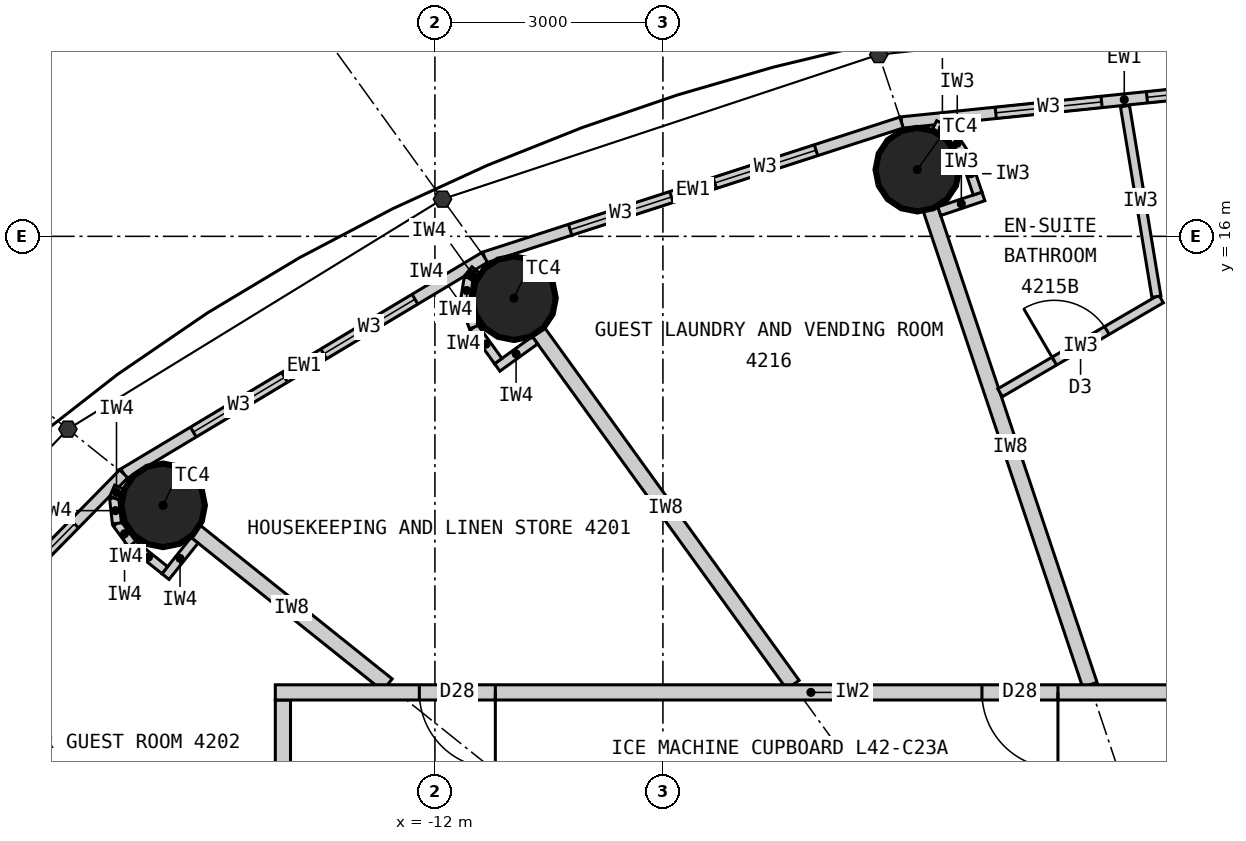
"""IFC4 building model, lengths in metres.
Left out: names, types, materials, properties, quantities, classifications, styles, units other than length and angle.
Written with IfcOpenShell. Run it as: python <this file> out.ifc"""

import sys

from ifc_helpers import new_model, si_unit, direction, frame, frame_2d, origin, origin_2d, place, context, subcontext, project, spatial, rectangle, circle, extrude, element, fill, save


model = new_model("IFC4")
c1 = context("Model", 3, precision=1e-05, world=origin(), true_north=direction((0.0, 1.0)))
c2 = subcontext(c1, "Body", "Model", "MODEL_VIEW")
j1 = project(units=[si_unit("LENGTHUNIT", "METRE"), si_unit("PLANEANGLEUNIT", "RADIAN")], contexts=[c1])
p1 = place(None, origin())
s1 = spatial("IfcSite", under=j1, at=p1, CompositionType="ELEMENT")
p2 = place(p1, origin())
s2 = spatial("IfcBuilding", under=s1, at=p2, CompositionType="ELEMENT")
p3 = place(p2, frame((0.0, 0.0, 159.9)))
s3 = spatial("IfcBuildingStorey", under=s2, at=p3, CompositionType="ELEMENT", Elevation=159.9)
for number, where, z_axis, x_axis in (
    (1, (-5.653, 16.877, 0.0), (0.0, 0.0, 1.0), (1.0, 0.0, 0.0)),
    (2, (-10.96, 15.186, 0.0), (0.0, 0.0, 1.0), (1.0, 0.0, 0.0)),
    (3, (-15.576, 12.461, 0.0), (0.0, 0.0, 1.0), (1.0, 0.0, 0.0)),
):
    element("IfcColumn", number, at=place(p3, frame(where, z_axis=z_axis, x_axis=x_axis)), inside=s3, PredefinedType="COLUMN", context=c2, shape_type="SweptSolid", body=[
        extrude(circle(Radius=0.55, at=origin_2d()), origin(), (0.0, 0.0, 1.0), 3.3),
    ])
p4 = place(p3, frame((0.0, 18.1, 0.0), z_axis=(0.0, 0.0, 1.0), x_axis=(-0.994751738032, -0.102318032045, 0.0)))
e4 = element("IfcWall", 4, at=p4, inside=s3, PredefinedType="ELEMENTEDWALL", context=c2, shape_type="SweptSolid", body=[
    extrude(rectangle(XDim=5.891, YDim=0.15, at=frame_2d((2.946, 0.0))), origin(), (0.0, 0.0, 1.0), 3.12),
])
p5 = place(p4, frame((1.246, 0.0, 0.9)))
e5 = element("IfcOpeningElement", 5, at=p5, cuts=e4, PredefinedType="OPENING", context=c2, shape_type="SweptSolid", body=[
    extrude(rectangle(XDim=1.4, YDim=1.9, at=frame_2d((0.7, 0.95))), frame((0.0, 0.085, 0.0), z_axis=(0.0, -1.0, 0.0), x_axis=(1.0, 0.0, 0.0)), (0.0, 0.0, 1.0), 0.17),
])
p6 = place(p4, frame((3.246, 0.0, 0.9)))
e6 = element("IfcOpeningElement", 6, at=p6, cuts=e4, PredefinedType="OPENING", context=c2, shape_type="SweptSolid", body=[
    extrude(rectangle(XDim=1.4, YDim=1.9, at=frame_2d((0.7, 0.95))), frame((0.0, 0.085, 0.0), z_axis=(0.0, -1.0, 0.0), x_axis=(1.0, 0.0, 0.0)), (0.0, 0.0, 1.0), 0.17),
])
p7 = place(p3, frame((-5.86, 17.497, 0.0), z_axis=(0.0, 0.0, 1.0), x_axis=(-0.951432482129, -0.307857486429, 0.0)))
e7 = element("IfcWall", 7, at=p7, inside=s3, PredefinedType="ELEMENTEDWALL", context=c2, shape_type="SweptSolid", body=[
    extrude(rectangle(XDim=5.766, YDim=0.15, at=frame_2d((2.883, 0.0))), origin(), (0.0, 0.0, 1.0), 3.12),
])
p8 = place(p7, frame((1.183, 0.0, 0.9)))
e8 = element("IfcOpeningElement", 8, at=p8, cuts=e7, PredefinedType="OPENING", context=c2, shape_type="SweptSolid", body=[
    extrude(rectangle(XDim=1.4, YDim=1.9, at=frame_2d((0.7, 0.95))), frame((0.0, 0.085, 0.0), z_axis=(0.0, -1.0, 0.0), x_axis=(1.0, 0.0, 0.0)), (0.0, 0.0, 1.0), 0.17),
])
p9 = place(p7, frame((3.183, 0.0, 0.9)))
e9 = element("IfcOpeningElement", 9, at=p9, cuts=e7, PredefinedType="OPENING", context=c2, shape_type="SweptSolid", body=[
    extrude(rectangle(XDim=1.4, YDim=1.9, at=frame_2d((0.7, 0.95))), frame((0.0, 0.085, 0.0), z_axis=(0.0, -1.0, 0.0), x_axis=(1.0, 0.0, 0.0)), (0.0, 0.0, 1.0), 0.17),
])
p10 = place(p3, frame((-11.346, 15.722, 0.0), z_axis=(0.0, 0.0, 1.0), x_axis=(-0.857695199231, -0.514158482587, 0.0)))
e10 = element("IfcWall", 10, at=p10, inside=s3, PredefinedType="ELEMENTEDWALL", context=c2, shape_type="SweptSolid", body=[
    extrude(rectangle(XDim=5.536, YDim=0.15, at=frame_2d((2.768, 0.0))), origin(), (0.0, 0.0, 1.0), 3.12),
])
p11 = place(p10, frame((1.068, 0.0, 0.9)))
e11 = element("IfcOpeningElement", 11, at=p11, cuts=e10, PredefinedType="OPENING", context=c2, shape_type="SweptSolid", body=[
    extrude(rectangle(XDim=1.4, YDim=1.9, at=frame_2d((0.7, 0.95))), frame((0.0, 0.085, 0.0), z_axis=(0.0, -1.0, 0.0), x_axis=(1.0, 0.0, 0.0)), (0.0, 0.0, 1.0), 0.17),
])
p12 = place(p10, frame((3.068, 0.0, 0.9)))
e12 = element("IfcOpeningElement", 12, at=p12, cuts=e10, PredefinedType="OPENING", context=c2, shape_type="SweptSolid", body=[
    extrude(rectangle(XDim=1.4, YDim=1.9, at=frame_2d((0.7, 0.95))), frame((0.0, 0.085, 0.0), z_axis=(0.0, -1.0, 0.0), x_axis=(1.0, 0.0, 0.0)), (0.0, 0.0, 1.0), 0.17),
])
p13 = place(p3, frame((-16.095, 12.876, 0.0), z_axis=(0.0, 0.0, 1.0), x_axis=(-0.700727467776, -0.71342905457, 0.0)))
e13 = element("IfcWall", 13, at=p13, inside=s3, PredefinedType="ELEMENTEDWALL", context=c2, shape_type="SweptSolid", body=[
    extrude(rectangle(XDim=5.247, YDim=0.15, at=frame_2d((2.624, 0.0))), origin(), (0.0, 0.0, 1.0), 3.12),
])
p14 = place(p13, frame((0.924, 0.0, 0.9)))
e14 = element("IfcOpeningElement", 14, at=p14, cuts=e13, PredefinedType="OPENING", context=c2, shape_type="SweptSolid", body=[
    extrude(rectangle(XDim=1.4, YDim=1.9, at=frame_2d((0.7, 0.95))), frame((0.0, 0.085, 0.0), z_axis=(0.0, -1.0, 0.0), x_axis=(1.0, 0.0, 0.0)), (0.0, 0.0, 1.0), 0.17),
])
p15 = place(p13, frame((2.924, 0.0, 0.9)))
e15 = element("IfcOpeningElement", 15, at=p15, cuts=e13, PredefinedType="OPENING", context=c2, shape_type="SweptSolid", body=[
    extrude(rectangle(XDim=1.4, YDim=1.9, at=frame_2d((0.7, 0.95))), frame((0.0, 0.085, 0.0), z_axis=(0.0, -1.0, 0.0), x_axis=(1.0, 0.0, 0.0)), (0.0, 0.0, 1.0), 0.17),
])
p16 = place(p3, frame((-3.383, 10.1, 0.0), z_axis=(0.0, 0.0, 1.0), x_axis=(-0.317615120474, 0.948219718866, 0.0)))
e16 = element("IfcWall", 16, at=p16, inside=s3, PredefinedType="PARTITIONING", context=c2, shape_type="SweptSolid", body=[
    extrude(rectangle(XDim=6.597, YDim=0.2, at=frame_2d((3.299, 0.0))), origin(), (0.0, 0.0, 1.0), 2.42),
])
p17 = place(p3, frame((-7.289, 10.1, 0.0), z_axis=(0.0, 0.0, 1.0), x_axis=(-0.585222595178, 0.810872686735, 0.0)))
e17 = element("IfcWall", 17, at=p17, inside=s3, PredefinedType="PARTITIONING", context=c2, shape_type="SweptSolid", body=[
    extrude(rectangle(XDim=5.722, YDim=0.2, at=frame_2d((2.861, 0.0))), origin(), (0.0, 0.0, 1.0), 2.42),
])
p18 = place(p3, frame((-12.625, 10.1, 0.0), z_axis=(0.0, 0.0, 1.0), x_axis=(-0.780876185034, 0.624685827954, 0.0)))
e18 = element("IfcWall", 18, at=p18, inside=s3, PredefinedType="PARTITIONING", context=c2, shape_type="SweptSolid", body=[
    extrude(rectangle(XDim=3.229, YDim=0.2, at=frame_2d((1.615, 0.0))), origin(), (0.0, 0.0, 1.0), 2.42),
])
p19 = place(p3, frame((-4.564, 13.942, 0.0), z_axis=(0.0, 0.0, 1.0), x_axis=(0.863717519451, 0.503976236139, 0.0)))
e19 = element("IfcWall", 19, at=p19, inside=s3, PredefinedType="PARTITIONING", context=c2, shape_type="SweptSolid", body=[
    extrude(rectangle(XDim=2.453, YDim=0.12, at=frame_2d((1.226, 0.0))), origin(), (0.0, 0.0, 1.0), 3.12),
])
p20 = place(p19, frame((0.826, 0.0, 0.0)))
e20 = element("IfcOpeningElement", 20, at=p20, cuts=e19, PredefinedType="OPENING", context=c2, shape_type="SweptSolid", body=[
    extrude(rectangle(XDim=0.8, YDim=2.1, at=frame_2d((0.4, 1.05))), frame((0.0, 0.07, 0.0), z_axis=(0.0, -1.0, 0.0), x_axis=(1.0, 0.0, 0.0)), (0.0, 0.0, 1.0), 0.14),
])
p21 = place(p3, frame((-2.508, 15.207, 0.0), z_axis=(0.0, 0.0, 1.0), x_axis=(-0.162637365963, 0.986685911115, 0.0)))
e21 = element("IfcWall", 21, at=p21, inside=s3, PredefinedType="PARTITIONING", context=c2, shape_type="SweptSolid", body=[
    extrude(rectangle(XDim=2.54, YDim=0.12, at=frame_2d((1.27, 0.0))), origin(), (0.0, 0.0, 1.0), 3.12),
])
p22 = place(p3, frame((-5.364, 16.331, 0.0), z_axis=(0.0, 0.0, 1.0), x_axis=(0.948283770087, 0.317423835572, 0.0)))
e22 = element("IfcWall", 22, at=p22, inside=s3, PredefinedType="PARTITIONING", context=c2, shape_type="SweptSolid", body=[
    extrude(rectangle(XDim=0.612, YDim=0.12, at=frame_2d((0.306, 0.0))), origin(), (0.0, 0.0, 1.0), 3.12),
])
p23 = place(p3, frame((-4.86, 16.563, 0.0), z_axis=(0.0, 0.0, 1.0), x_axis=(-0.317825321803, 0.948149284038, 0.0)))
e23 = element("IfcWall", 23, at=p23, inside=s3, PredefinedType="PARTITIONING", context=c2, shape_type="SweptSolid", body=[
    extrude(rectangle(XDim=0.55, YDim=0.12, at=frame_2d((0.275, 0.0))), origin(), (0.0, 0.0, 1.0), 3.12),
])
p24 = place(p3, frame((-5.034, 17.084, 0.0), z_axis=(0.0, 0.0, 1.0), x_axis=(-0.552362205726, 0.833604218851, 0.0)))
e24 = element("IfcWall", 24, at=p24, inside=s3, PredefinedType="PARTITIONING", context=c2, shape_type="SweptSolid", body=[
    extrude(rectangle(XDim=0.338, YDim=0.12, at=frame_2d((0.169, 0.0))), origin(), (0.0, 0.0, 1.0), 3.12),
])
p25 = place(p3, frame((-5.221, 17.366, 0.0), z_axis=(0.0, 0.0, 1.0), x_axis=(-0.895067896179, 0.445929883759, 0.0)))
e25 = element("IfcWall", 25, at=p25, inside=s3, PredefinedType="PARTITIONING", context=c2, shape_type="SweptSolid", body=[
    extrude(rectangle(XDim=0.228, YDim=0.12, at=frame_2d((0.114, 0.0))), origin(), (0.0, 0.0, 1.0), 3.12),
])
p26 = place(p3, frame((-14.0, 9.9, 0.0), z_axis=(0.0, 0.0, 1.0), x_axis=(0.0, -1.0, 0.0)))
e26 = element("IfcWall", 26, at=p26, inside=s3, PredefinedType="PARTITIONING", context=c2, shape_type="SweptSolid", body=[
    extrude(rectangle(XDim=8.23, YDim=0.2, at=frame_2d((4.115, 0.0))), origin(), (0.0, 0.0, 1.0), 3.12),
])
p27 = place(p26, frame((1.678, 0.0, 0.0)))
e27 = element("IfcOpeningElement", 27, at=p27, cuts=e26, PredefinedType="OPENING", context=c2, shape_type="SweptSolid", body=[
    extrude(rectangle(XDim=1.0, YDim=2.2, at=frame_2d((0.5, 1.1))), frame((0.0, 0.11, 0.0), z_axis=(0.0, -1.0, 0.0), x_axis=(1.0, 0.0, 0.0)), (0.0, 0.0, 1.0), 0.22),
])
p28 = place(p3, frame((-14.1, 10.0, 0.0), z_axis=(0.0, 0.0, 1.0), x_axis=(1.0, 0.0, 0.0)))
e28 = element("IfcWall", 28, at=p28, inside=s3, PredefinedType="PARTITIONING", context=c2, shape_type="SweptSolid", body=[
    extrude(rectangle(XDim=14.094, YDim=0.2, at=frame_2d((7.047, 0.0))), origin(), (0.0, 0.0, 1.0), 3.12),
])
p29 = place(p28, frame((1.895, 0.0, 0.0)))
e29 = element("IfcOpeningElement", 29, at=p29, cuts=e28, PredefinedType="OPENING", context=c2, shape_type="SweptSolid", body=[
    extrude(rectangle(XDim=1.0, YDim=2.2, at=frame_2d((0.5, 1.1))), frame((0.0, 0.11, 0.0), z_axis=(0.0, -1.0, 0.0), x_axis=(1.0, 0.0, 0.0)), (0.0, 0.0, 1.0), 0.22),
])
p30 = place(p28, frame((9.297, 0.0, 0.0)))
e30 = element("IfcOpeningElement", 30, at=p30, cuts=e28, PredefinedType="OPENING", context=c2, shape_type="SweptSolid", body=[
    extrude(rectangle(XDim=1.0, YDim=2.2, at=frame_2d((0.5, 1.1))), frame((0.0, 0.11, 0.0), z_axis=(0.0, -1.0, 0.0), x_axis=(1.0, 0.0, 0.0)), (0.0, 0.0, 1.0), 0.22),
])
p31 = place(p3, frame((-10.684, 14.633, 0.0), z_axis=(0.0, 0.0, 1.0), x_axis=(-0.810921075692, -0.585155542568, 0.0)))
e31 = element("IfcWall", 31, at=p31, inside=s3, PredefinedType="PARTITIONING", context=c2, shape_type="SweptSolid", body=[
    extrude(rectangle(XDim=0.612, YDim=0.12, at=frame_2d((0.306, 0.0))), origin(), (0.0, 0.0, 1.0), 3.12),
])
p32 = place(p3, frame((-11.167, 14.359, 0.0), z_axis=(0.0, 0.0, 1.0), x_axis=(-0.585263549799, 0.810843127415, 0.0)))
e32 = element("IfcWall", 32, at=p32, inside=s3, PredefinedType="PARTITIONING", context=c2, shape_type="SweptSolid", body=[
    extrude(rectangle(XDim=0.55, YDim=0.12, at=frame_2d((0.275, 0.0))), origin(), (0.0, 0.0, 1.0), 3.12),
])
for number, where, z_axis, x_axis in (
    (33, (-11.489, 14.804, 0.0), (0.0, 0.0, 1.0), (-0.356, 0.935, 0.0)),
    (34, (-11.609, 15.12, 0.0), (0.0, 0.0, 1.0), (0.16, 0.987, 0.0)),
):
    element("IfcWall", number, at=place(p3, frame(where, z_axis=z_axis, x_axis=x_axis)), inside=s3, PredefinedType="PARTITIONING", context=c2, shape_type="SweptSolid", body=[
        extrude(rectangle(XDim=0.338, YDim=0.12, at=frame_2d((0.169, 0.0))), origin(), (0.0, 0.0, 1.0), 3.12),
    ])
p33 = place(p3, frame((-11.555, 15.453, 0.0), z_axis=(0.0, 0.0, 1.0), x_axis=(0.631711901025, 0.775203246964, 0.0)))
e35 = element("IfcWall", 35, at=p33, inside=s3, PredefinedType="PARTITIONING", context=c2, shape_type="SweptSolid", body=[
    extrude(rectangle(XDim=0.139, YDim=0.12, at=frame_2d((0.07, 0.0))), origin(), (0.0, 0.0, 1.0), 3.12),
])
p34 = place(p3, frame((-15.162, 12.002, 0.0), z_axis=(0.0, 0.0, 1.0), x_axis=(-0.624597762427, -0.780946627607, 0.0)))
e36 = element("IfcWall", 36, at=p34, inside=s3, PredefinedType="PARTITIONING", context=c2, shape_type="SweptSolid", body=[
    extrude(rectangle(XDim=0.612, YDim=0.12, at=frame_2d((0.306, 0.0))), origin(), (0.0, 0.0, 1.0), 3.12),
])
p35 = place(p3, frame((-15.554, 11.608, 0.0), z_axis=(0.0, 0.0, 1.0), x_axis=(-0.780695577787, 0.624911525597, 0.0)))
e37 = element("IfcWall", 37, at=p35, inside=s3, PredefinedType="PARTITIONING", context=c2, shape_type="SweptSolid", body=[
    extrude(rectangle(XDim=0.55, YDim=0.12, at=frame_2d((0.275, 0.0))), origin(), (0.0, 0.0, 1.0), 3.12),
])
p36 = place(p3, frame((-15.984, 11.952, 0.0), z_axis=(0.0, 0.0, 1.0), x_axis=(-0.592335221171, 0.805691619517, 0.0)))
e38 = element("IfcWall", 38, at=p36, inside=s3, PredefinedType="PARTITIONING", context=c2, shape_type="SweptSolid", body=[
    extrude(rectangle(XDim=0.338, YDim=0.12, at=frame_2d((0.169, 0.0))), origin(), (0.0, 0.0, 1.0), 3.12),
])
p37 = place(p3, frame((-16.184, 12.224, 0.0), z_axis=(0.0, 0.0, 1.0), x_axis=(-0.110669692975, 0.993857242795, 0.0)))
e39 = element("IfcWall", 39, at=p37, inside=s3, PredefinedType="PARTITIONING", context=c2, shape_type="SweptSolid", body=[
    extrude(rectangle(XDim=0.337, YDim=0.12, at=frame_2d((0.169, 0.0))), origin(), (0.0, 0.0, 1.0), 3.12),
])
p38 = place(p3, frame((-16.221, 12.559, 0.0), z_axis=(0.0, 0.0, 1.0), x_axis=(0.401064416249, 0.916049853457, 0.0)))
e40 = element("IfcWall", 40, at=p38, inside=s3, PredefinedType="PARTITIONING", context=c2, shape_type="SweptSolid", body=[
    extrude(rectangle(XDim=0.156, YDim=0.12, at=frame_2d((0.078, 0.0))), origin(), (0.0, 0.0, 1.0), 3.12),
])
p39 = place(p5, origin())
e41 = element("IfcWindow", 41, at=p39, inside=s3, PartitioningType="SINGLE_PANEL", PredefinedType="WINDOW", context=c2, shape_type="SweptSolid", body=[
    extrude(rectangle(XDim=1.4, YDim=1.9, at=frame_2d((0.7, 0.95))), frame((0.0, 0.03, 0.0), z_axis=(0.0, -1.0, 0.0), x_axis=(1.0, 0.0, 0.0)), (0.0, 0.0, 1.0), 0.06),
])
fill(e5, e41)
p40 = place(p6, origin())
e42 = element("IfcWindow", 42, at=p40, inside=s3, PartitioningType="SINGLE_PANEL", PredefinedType="WINDOW", context=c2, shape_type="SweptSolid", body=[
    extrude(rectangle(XDim=1.4, YDim=1.9, at=frame_2d((0.7, 0.95))), frame((0.0, 0.03, 0.0), z_axis=(0.0, -1.0, 0.0), x_axis=(1.0, 0.0, 0.0)), (0.0, 0.0, 1.0), 0.06),
])
fill(e6, e42)
p41 = place(p8, origin())
e43 = element("IfcWindow", 43, at=p41, inside=s3, PartitioningType="SINGLE_PANEL", PredefinedType="WINDOW", context=c2, shape_type="SweptSolid", body=[
    extrude(rectangle(XDim=1.4, YDim=1.9, at=frame_2d((0.7, 0.95))), frame((0.0, 0.03, 0.0), z_axis=(0.0, -1.0, 0.0), x_axis=(1.0, 0.0, 0.0)), (0.0, 0.0, 1.0), 0.06),
])
fill(e8, e43)
p42 = place(p9, origin())
e44 = element("IfcWindow", 44, at=p42, inside=s3, PartitioningType="SINGLE_PANEL", PredefinedType="WINDOW", context=c2, shape_type="SweptSolid", body=[
    extrude(rectangle(XDim=1.4, YDim=1.9, at=frame_2d((0.7, 0.95))), frame((0.0, 0.03, 0.0), z_axis=(0.0, -1.0, 0.0), x_axis=(1.0, 0.0, 0.0)), (0.0, 0.0, 1.0), 0.06),
])
fill(e9, e44)
p43 = place(p11, origin())
e45 = element("IfcWindow", 45, at=p43, inside=s3, PartitioningType="SINGLE_PANEL", PredefinedType="WINDOW", context=c2, shape_type="SweptSolid", body=[
    extrude(rectangle(XDim=1.4, YDim=1.9, at=frame_2d((0.7, 0.95))), frame((0.0, 0.03, 0.0), z_axis=(0.0, -1.0, 0.0), x_axis=(1.0, 0.0, 0.0)), (0.0, 0.0, 1.0), 0.06),
])
fill(e11, e45)
p44 = place(p12, origin())
e46 = element("IfcWindow", 46, at=p44, inside=s3, PartitioningType="SINGLE_PANEL", PredefinedType="WINDOW", context=c2, shape_type="SweptSolid", body=[
    extrude(rectangle(XDim=1.4, YDim=1.9, at=frame_2d((0.7, 0.95))), frame((0.0, 0.03, 0.0), z_axis=(0.0, -1.0, 0.0), x_axis=(1.0, 0.0, 0.0)), (0.0, 0.0, 1.0), 0.06),
])
fill(e12, e46)
p45 = place(p14, origin())
e47 = element("IfcWindow", 47, at=p45, inside=s3, PartitioningType="SINGLE_PANEL", PredefinedType="WINDOW", context=c2, shape_type="SweptSolid", body=[
    extrude(rectangle(XDim=1.4, YDim=1.9, at=frame_2d((0.7, 0.95))), frame((0.0, 0.03, 0.0), z_axis=(0.0, -1.0, 0.0), x_axis=(1.0, 0.0, 0.0)), (0.0, 0.0, 1.0), 0.06),
])
fill(e14, e47)
p46 = place(p29, origin())
e48 = element("IfcDoor", 48, at=p46, inside=s3, OperationType="SINGLE_SWING_RIGHT", PredefinedType="DOOR", context=c2, shape_type="SweptSolid", body=[
    extrude(rectangle(XDim=1.0, YDim=2.2, at=frame_2d((0.5, 1.1))), frame((0.0, 0.025, 0.0), z_axis=(0.0, -1.0, 0.0), x_axis=(1.0, 0.0, 0.0)), (0.0, 0.0, 1.0), 0.05),
])
fill(e29, e48)
p47 = place(p20, origin())
e49 = element("IfcDoor", 49, at=p47, inside=s3, OperationType="SINGLE_SWING_LEFT", PredefinedType="DOOR", context=c2, shape_type="SweptSolid", body=[
    extrude(rectangle(XDim=0.8, YDim=2.1, at=frame_2d((0.4, 1.05))), frame((0.0, 0.025, 0.0), z_axis=(0.0, -1.0, 0.0), x_axis=(1.0, 0.0, 0.0)), (0.0, 0.0, 1.0), 0.05),
])
fill(e20, e49)
p48 = place(p30, origin())
e50 = element("IfcDoor", 50, at=p48, inside=s3, OperationType="SINGLE_SWING_RIGHT", PredefinedType="DOOR", context=c2, shape_type="SweptSolid", body=[
    extrude(rectangle(XDim=1.0, YDim=2.2, at=frame_2d((0.5, 1.1))), frame((0.0, 0.025, 0.0), z_axis=(0.0, -1.0, 0.0), x_axis=(1.0, 0.0, 0.0)), (0.0, 0.0, 1.0), 0.05),
])
fill(e30, e50)
save(model, sys.argv[1])
